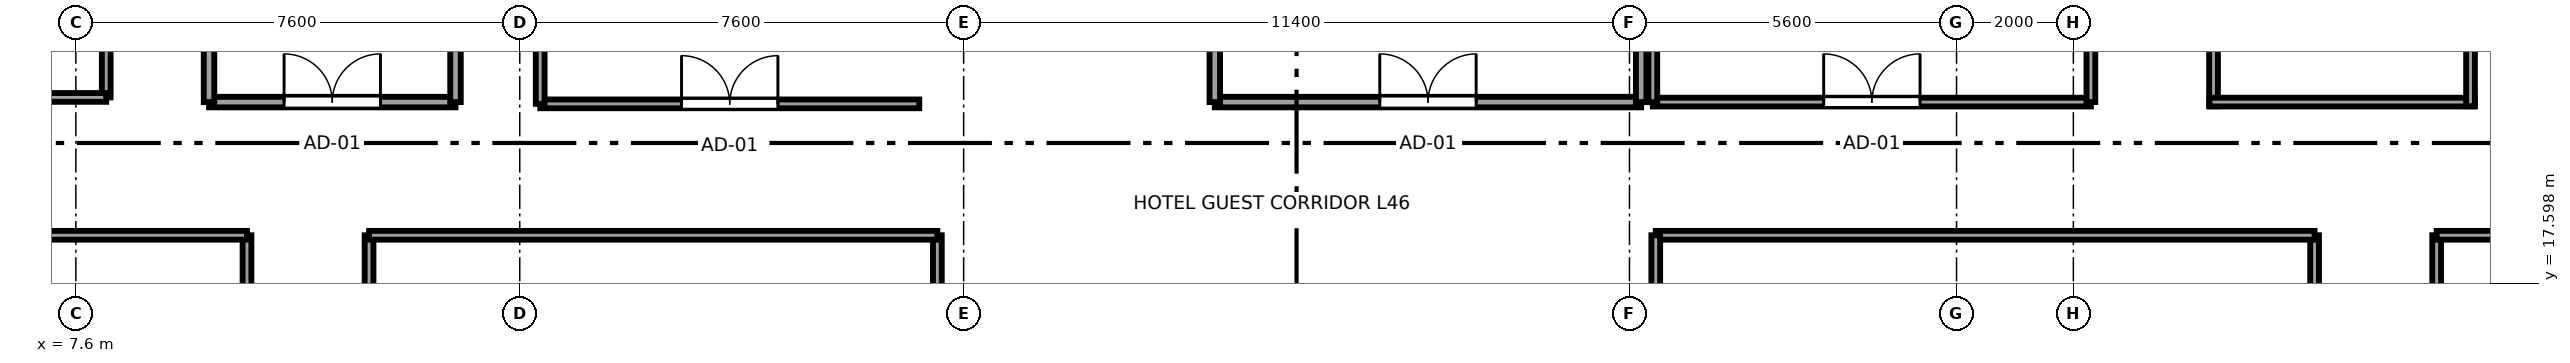
"""IFC4 building model, lengths in metres.
Left out: names, types, materials, properties, quantities, classifications, styles, units other than length and angle.
Written with IfcOpenShell. Run it as: python <this file> out.ifc"""

import sys

from ifc_helpers import new_model, si_unit, direction, frame, frame_2d, origin, place, context, subcontext, project, spatial, rectangle, extrude, source, transform, mapped, element, fill, save


model = new_model("IFC4")
c1 = context("Model", 3, precision=1e-05, world=origin(), true_north=direction((0.0, 1.0)))
c2 = subcontext(c1, "Body", "Model", "MODEL_VIEW")
j1 = project(units=[si_unit("LENGTHUNIT", "METRE"), si_unit("PLANEANGLEUNIT", "RADIAN")], contexts=[c1])
p1 = place(None, origin())
s1 = spatial("IfcSite", under=j1, at=p1, CompositionType="ELEMENT")
p2 = place(p1, origin())
s2 = spatial("IfcBuilding", under=s1, at=p2, CompositionType="ELEMENT")
p3 = place(p2, frame((0.0, 0.0, 175.45)))
s3 = spatial("IfcBuildingStorey", under=s2, at=p3, CompositionType="ELEMENT", Elevation=175.45)
p4 = place(p3, frame((10.53, 15.313, 0.0), z_axis=(0.0, 0.0, 1.0), x_axis=(0.0, 1.0, 0.0)))
e1 = element("IfcWall", 1, at=p4, inside=s3, PredefinedType="PARTITIONING", context=c2, shape_type="SweptSolid", body=[
    extrude(rectangle(XDim=3.107, YDim=0.15, at=frame_2d((1.553, 0.0))), origin(), (0.0, 0.0, 1.0), 3.37),
])
p5 = place(p4, frame((1.043, 0.0, 0.0)))
e2 = element("IfcOpeningElement", 2, at=p5, cuts=e1, PredefinedType="OPENING", context=c2, shape_type="SweptSolid", body=[
    extrude(rectangle(XDim=0.98, YDim=2.12, at=frame_2d((0.49, 1.06))), frame((0.0, 0.085, 0.0), z_axis=(0.0, -1.0, 0.0), x_axis=(1.0, 0.0, 0.0)), (0.0, 0.0, 1.0), 0.17),
])
p6 = place(p3, frame((3.005, 18.42, 0.0), z_axis=(0.0, 0.0, 1.0), x_axis=(1.0, 0.0, 0.0)))
e3 = element("IfcWall", 3, at=p6, inside=s3, PredefinedType="PARTITIONING", context=c2, shape_type="SweptSolid", body=[
    extrude(rectangle(XDim=7.525, YDim=0.15, at=frame_2d((3.763, 0.0))), origin(), (0.0, 0.0, 1.0), 3.37),
])
p7 = place(p3, frame((12.62, 13.21, 0.0), z_axis=(0.0, 0.0, 1.0), x_axis=(0.0, 1.0, 0.0)))
e4 = element("IfcWall", 4, at=p7, inside=s3, PredefinedType="PARTITIONING", context=c2, shape_type="SweptSolid", body=[
    extrude(rectangle(XDim=5.21, YDim=0.15, at=frame_2d((2.605, 0.0))), origin(), (0.0, 0.0, 1.0), 3.37),
])
p8 = place(p7, frame((2.095, 0.0, 0.0)))
e5 = element("IfcOpeningElement", 5, at=p8, cuts=e4, PredefinedType="OPENING", context=c2, shape_type="SweptSolid", body=[
    extrude(rectangle(XDim=0.98, YDim=2.12, at=frame_2d((0.49, 1.06))), frame((0.0, 0.085, 0.0), z_axis=(0.0, -1.0, 0.0), x_axis=(1.0, 0.0, 0.0)), (0.0, 0.0, 1.0), 0.17),
])
p9 = place(p3, frame((22.35, 10.88, 0.0), z_axis=(0.0, 0.0, 1.0), x_axis=(0.0, 1.0, 0.0)))
e6 = element("IfcWall", 6, at=p9, inside=s3, PredefinedType="PARTITIONING", context=c2, shape_type="SweptSolid", body=[
    extrude(rectangle(XDim=7.54, YDim=0.15, at=frame_2d((3.77, 0.0))), origin(), (0.0, 0.0, 1.0), 3.37),
])
p10 = place(p3, frame((12.62, 18.42, 0.0), z_axis=(0.0, 0.0, 1.0), x_axis=(1.0, 0.0, 0.0)))
e7 = element("IfcWall", 7, at=p10, inside=s3, PredefinedType="PARTITIONING", context=c2, shape_type="SweptSolid", body=[
    extrude(rectangle(XDim=9.73, YDim=0.15, at=frame_2d((4.865, 0.0))), origin(), (0.0, 0.0, 1.0), 3.37),
])
p11 = place(p3, frame((45.93, 15.437, 0.0), z_axis=(0.0, 0.0, 1.0), x_axis=(0.0, 1.0, 0.0)))
e8 = element("IfcWall", 8, at=p11, inside=s3, PredefinedType="PARTITIONING", context=c2, shape_type="SweptSolid", body=[
    extrude(rectangle(XDim=2.983, YDim=0.15, at=frame_2d((1.491, 0.0))), origin(), (0.0, 0.0, 1.0), 3.37),
])
p12 = place(p11, frame((0.981, 0.0, 0.0)))
e9 = element("IfcOpeningElement", 9, at=p12, cuts=e8, PredefinedType="OPENING", context=c2, shape_type="SweptSolid", body=[
    extrude(rectangle(XDim=0.98, YDim=2.12, at=frame_2d((0.49, 1.06))), frame((0.0, 0.085, 0.0), z_axis=(0.0, -1.0, 0.0), x_axis=(1.0, 0.0, 0.0)), (0.0, 0.0, 1.0), 0.17),
])
p13 = place(p3, frame((34.65, 18.42, 0.0), z_axis=(0.0, 0.0, 1.0), x_axis=(1.0, 0.0, 0.0)))
e10 = element("IfcWall", 10, at=p13, inside=s3, PredefinedType="PARTITIONING", context=c2, shape_type="SweptSolid", body=[
    extrude(rectangle(XDim=11.28, YDim=0.15, at=frame_2d((5.64, 0.0))), origin(), (0.0, 0.0, 1.0), 3.37),
])
p14 = place(p3, frame((34.65, 13.48, 0.0), z_axis=(0.0, 0.0, 1.0), x_axis=(0.0, 1.0, 0.0)))
e11 = element("IfcWall", 11, at=p14, inside=s3, PredefinedType="PARTITIONING", context=c2, shape_type="SweptSolid", body=[
    extrude(rectangle(XDim=4.94, YDim=0.15, at=frame_2d((2.47, 0.0))), origin(), (0.0, 0.0, 1.0), 3.37),
])
p15 = place(p3, frame((48.02, 15.313, 0.0), z_axis=(0.0, 0.0, 1.0), x_axis=(0.0, 1.0, 0.0)))
e12 = element("IfcWall", 12, at=p15, inside=s3, PredefinedType="PARTITIONING", context=c2, shape_type="SweptSolid", body=[
    extrude(rectangle(XDim=3.107, YDim=0.15, at=frame_2d((1.553, 0.0))), origin(), (0.0, 0.0, 1.0), 3.37),
])
p16 = place(p15, frame((1.043, 0.0, 0.0)))
e13 = element("IfcOpeningElement", 13, at=p16, cuts=e12, PredefinedType="OPENING", context=c2, shape_type="SweptSolid", body=[
    extrude(rectangle(XDim=0.98, YDim=2.12, at=frame_2d((0.49, 1.06))), frame((0.0, 0.085, 0.0), z_axis=(0.0, -1.0, 0.0), x_axis=(1.0, 0.0, 0.0)), (0.0, 0.0, 1.0), 0.17),
])
p17 = place(p3, frame((48.02, 18.42, 0.0), z_axis=(0.0, 0.0, 1.0), x_axis=(1.0, 0.0, 0.0)))
e14 = element("IfcWall", 14, at=p17, inside=s3, PredefinedType="PARTITIONING", context=c2, shape_type="SweptSolid", body=[
    extrude(rectangle(XDim=5.975, YDim=0.15, at=frame_2d((2.988, 0.0))), origin(), (0.0, 0.0, 1.0), 3.37),
])
p18 = place(p3, frame((8.12, 20.78, 0.0), z_axis=(0.0, 0.0, 1.0), x_axis=(0.0, 1.0, 0.0)))
e15 = element("IfcWall", 15, at=p18, inside=s3, PredefinedType="PARTITIONING", context=c2, shape_type="SweptSolid", body=[
    extrude(rectangle(XDim=13.54, YDim=0.15, at=frame_2d((6.77, 0.0))), origin(), (0.0, 0.0, 1.0), 3.37),
])
p19 = place(p18, frame((6.28, 0.0, 0.0)))
e16 = element("IfcOpeningElement", 16, at=p19, cuts=e15, PredefinedType="OPENING", context=c2, shape_type="SweptSolid", body=[
    extrude(rectangle(XDim=0.98, YDim=2.12, at=frame_2d((0.49, 1.06))), frame((0.0, 0.085, 0.0), z_axis=(0.0, -1.0, 0.0), x_axis=(1.0, 0.0, 0.0)), (0.0, 0.0, 1.0), 0.17),
])
p20 = place(p3, frame((5.07, 20.78, 0.0), z_axis=(0.0, 0.0, 1.0), x_axis=(1.0, 0.0, 0.0)))
e17 = element("IfcWall", 17, at=p20, inside=s3, PredefinedType="PARTITIONING", context=c2, shape_type="SweptSolid", body=[
    extrude(rectangle(XDim=3.05, YDim=0.15, at=frame_2d((1.525, 0.0))), origin(), (0.0, 0.0, 1.0), 3.37),
])
p21 = place(p3, frame((44.2, 20.63, 0.0), z_axis=(0.0, 0.0, 1.0), x_axis=(0.0, 1.0, 0.0)))
e18 = element("IfcWall", 18, at=p21, inside=s3, PredefinedType="PARTITIONING", context=c2, shape_type="SweptSolid", body=[
    extrude(rectangle(XDim=3.94, YDim=0.15, at=frame_2d((1.97, 0.0))), origin(), (0.0, 0.0, 1.0), 3.37),
])
p22 = place(p21, frame((1.34, 0.0, 0.0)))
e19 = element("IfcOpeningElement", 19, at=p22, cuts=e18, PredefinedType="OPENING", context=c2, shape_type="SweptSolid", body=[
    extrude(rectangle(XDim=0.92, YDim=2.01, at=frame_2d((0.46, 1.005))), frame((0.0, 0.085, 0.0), z_axis=(0.0, -1.0, 0.0), x_axis=(1.0, 0.0, 0.0)), (0.0, 0.0, 1.0), 0.17),
])
p23 = place(p3, frame((44.13, 20.7, 0.0), z_axis=(0.0, 0.0, 1.0), x_axis=(1.0, 0.0, 0.0)))
e20 = element("IfcWall", 20, at=p23, inside=s3, PredefinedType="PARTITIONING", context=c2, shape_type="SweptSolid", body=[
    extrude(rectangle(XDim=4.54, YDim=0.15, at=frame_2d((2.27, 0.0))), origin(), (0.0, 0.0, 1.0), 3.37),
])
p24 = place(p3, frame((48.6, 20.63, 0.0), z_axis=(0.0, 0.0, 1.0), x_axis=(0.0, 1.0, 0.0)))
e21 = element("IfcWall", 21, at=p24, inside=s3, PredefinedType="PARTITIONING", context=c2, shape_type="SweptSolid", body=[
    extrude(rectangle(XDim=3.94, YDim=0.15, at=frame_2d((1.97, 0.0))), origin(), (0.0, 0.0, 1.0), 3.37),
])
p25 = place(p3, frame((9.88, 20.7, 0.0), z_axis=(0.0, 0.0, 1.0), x_axis=(1.0, 0.0, 0.0)))
e22 = element("IfcWall", 22, at=p25, inside=s3, PredefinedType="PARTITIONING", context=c2, shape_type="SweptSolid", body=[
    extrude(rectangle(XDim=4.22, YDim=0.18, at=frame_2d((2.11, 0.0))), origin(), (0.0, 0.0, 1.0), 3.37),
])
p26 = place(p25, frame((1.285, 0.0, 0.0)))
e23 = element("IfcOpeningElement", 23, at=p26, cuts=e22, PredefinedType="OPENING", context=c2, shape_type="SweptSolid", body=[
    extrude(rectangle(XDim=1.65, YDim=2.15, at=frame_2d((0.825, 1.075))), frame((0.0, 0.1, 0.0), z_axis=(0.0, -1.0, 0.0), x_axis=(1.0, 0.0, 0.0)), (0.0, 0.0, 1.0), 0.2),
])
for number, where, z_axis, x_axis in (
    (24, (9.88, 20.7, 0.0), (0.0, 0.0, 1.0), (0.0, 1.0, 0.0)),
    (25, (14.1, 20.7, 0.0), (0.0, 0.0, 1.0), (0.0, 1.0, 0.0)),
):
    element("IfcWall", number, at=place(p3, frame(where, z_axis=z_axis, x_axis=x_axis)), inside=s3, PredefinedType="PARTITIONING", context=c2, shape_type="SweptSolid", body=[
        extrude(rectangle(XDim=9.05, YDim=0.18, at=frame_2d((4.525, 0.0))), origin(), (0.0, 0.0, 1.0), 3.37),
    ])
p27 = place(p3, frame((27.1, 20.7, 0.0), z_axis=(0.0, 0.0, 1.0), x_axis=(1.0, 0.0, 0.0)))
e26 = element("IfcWall", 26, at=p27, inside=s3, PredefinedType="PARTITIONING", context=c2, shape_type="SweptSolid", body=[
    extrude(rectangle(XDim=7.3, YDim=0.18, at=frame_2d((3.65, 0.0))), origin(), (0.0, 0.0, 1.0), 3.37),
])
p28 = place(p27, frame((2.825, 0.0, 0.0)))
e27 = element("IfcOpeningElement", 27, at=p28, cuts=e26, PredefinedType="OPENING", context=c2, shape_type="SweptSolid", body=[
    extrude(rectangle(XDim=1.65, YDim=2.15, at=frame_2d((0.825, 1.075))), frame((0.0, 0.1, 0.0), z_axis=(0.0, -1.0, 0.0), x_axis=(1.0, 0.0, 0.0)), (0.0, 0.0, 1.0), 0.2),
])
for number, where, z_axis, x_axis in (
    (28, (27.1, 20.7, 0.0), (0.0, 0.0, 1.0), (0.0, 1.0, 0.0)),
    (29, (34.4, 20.7, 0.0), (0.0, 0.0, 1.0), (0.0, 1.0, 0.0)),
):
    element("IfcWall", number, at=place(p3, frame(where, z_axis=z_axis, x_axis=x_axis)), inside=s3, PredefinedType="PARTITIONING", context=c2, shape_type="SweptSolid", body=[
        extrude(rectangle(XDim=9.1, YDim=0.18, at=frame_2d((4.55, 0.0))), origin(), (0.0, 0.0, 1.0), 3.37),
    ])
p29 = place(p3, frame((15.55, 20.67, 0.0), z_axis=(0.0, 0.0, 1.0), x_axis=(1.0, 0.0, 0.0)))
e30 = element("IfcWall", 30, at=p29, inside=s3, PredefinedType="PARTITIONING", context=c2, shape_type="SweptSolid", body=[
    extrude(rectangle(XDim=6.49, YDim=0.15, at=frame_2d((3.245, 0.0))), origin(), (0.0, 0.0, 1.0), 3.37),
])
p30 = place(p29, frame((2.42, 0.0, 0.0)))
e31 = element("IfcOpeningElement", 31, at=p30, cuts=e30, PredefinedType="OPENING", context=c2, shape_type="SweptSolid", body=[
    extrude(rectangle(XDim=1.65, YDim=2.15, at=frame_2d((0.825, 1.075))), frame((0.0, 0.085, 0.0), z_axis=(0.0, -1.0, 0.0), x_axis=(1.0, 0.0, 0.0)), (0.0, 0.0, 1.0), 0.17),
])
p31 = place(p3, frame((15.55, 20.67, 0.0), z_axis=(0.0, 0.0, 1.0), x_axis=(0.0, 1.0, 0.0)))
e32 = element("IfcWall", 32, at=p31, inside=s3, PredefinedType="PARTITIONING", context=c2, shape_type="SweptSolid", body=[
    extrude(rectangle(XDim=4.08, YDim=0.15, at=frame_2d((2.04, 0.0))), origin(), (0.0, 0.0, 1.0), 3.37),
])
p32 = place(p3, frame((34.6, 20.7, 0.0), z_axis=(0.0, 0.0, 1.0), x_axis=(1.0, 0.0, 0.0)))
e33 = element("IfcWall", 33, at=p32, inside=s3, PredefinedType="PARTITIONING", context=c2, shape_type="SweptSolid", body=[
    extrude(rectangle(XDim=7.5, YDim=0.15, at=frame_2d((3.75, 0.0))), origin(), (0.0, 0.0, 1.0), 3.37),
])
p33 = place(p32, frame((2.925, 0.0, 0.0)))
e34 = element("IfcOpeningElement", 34, at=p33, cuts=e33, PredefinedType="OPENING", context=c2, shape_type="SweptSolid", body=[
    extrude(rectangle(XDim=1.65, YDim=2.15, at=frame_2d((0.825, 1.075))), frame((0.0, 0.085, 0.0), z_axis=(0.0, -1.0, 0.0), x_axis=(1.0, 0.0, 0.0)), (0.0, 0.0, 1.0), 0.17),
])
p34 = place(p3, frame((34.6, 20.7, 0.0), z_axis=(0.0, 0.0, 1.0), x_axis=(0.0, 1.0, 0.0)))
e35 = element("IfcWall", 35, at=p34, inside=s3, PredefinedType="PARTITIONING", context=c2, shape_type="SweptSolid", body=[
    extrude(rectangle(XDim=8.7, YDim=0.15, at=frame_2d((4.35, 0.0))), origin(), (0.0, 0.0, 1.0), 3.37),
])
p35 = place(p3, frame((42.1, 20.7, 0.0), z_axis=(0.0, 0.0, 1.0), x_axis=(0.0, 1.0, 0.0)))
e36 = element("IfcWall", 36, at=p35, inside=s3, PredefinedType="PARTITIONING", context=c2, shape_type="SweptSolid", body=[
    extrude(rectangle(XDim=8.7, YDim=0.15, at=frame_2d((4.35, 0.0))), origin(), (0.0, 0.0, 1.0), 2.16),
])
m1 = source(origin(), c2, "Body", "SweptSolid", [
    extrude(rectangle(XDim=1.65, YDim=2.15, at=frame_2d((0.825, 1.075))), frame((0.0, 0.025, 0.0), z_axis=(0.0, -1.0, 0.0), x_axis=(1.0, 0.0, 0.0)), (0.0, 0.0, 1.0), 0.05),
])
p36 = place(p26, origin())
e37 = element("IfcDoor", 37, at=p36, inside=s3, OperationType="DOUBLE_DOOR_SINGLE_SWING", PredefinedType="DOOR", context=c2, shape_type="MappedRepresentation", body=[
    mapped(m1, transform((0.0, 0.0, 0.0), x_axis=(1.0, 0.0, 0.0), y_axis=(0.0, 1.0, 0.0), z_axis=(0.0, 0.0, 1.0), scale=1.0)),
])
fill(e23, e37)
p37 = place(p28, origin())
e38 = element("IfcDoor", 38, at=p37, inside=s3, OperationType="DOUBLE_DOOR_SINGLE_SWING", PredefinedType="DOOR", context=c2, shape_type="MappedRepresentation", body=[
    mapped(m1, transform((0.0, 0.0, 0.0), x_axis=(1.0, 0.0, 0.0), y_axis=(0.0, 1.0, 0.0), z_axis=(0.0, 0.0, 1.0), scale=1.0)),
])
fill(e27, e38)
p38 = place(p30, origin())
e39 = element("IfcDoor", 39, at=p38, inside=s3, OperationType="DOUBLE_DOOR_SINGLE_SWING", PredefinedType="DOOR", context=c2, shape_type="MappedRepresentation", body=[
    mapped(m1, transform((0.0, 0.0, 0.0), x_axis=(1.0, 0.0, 0.0), y_axis=(0.0, 1.0, 0.0), z_axis=(0.0, 0.0, 1.0), scale=1.0)),
])
fill(e31, e39)
p39 = place(p33, origin())
e40 = element("IfcDoor", 40, at=p39, inside=s3, OperationType="DOUBLE_DOOR_SINGLE_SWING", PredefinedType="DOOR", context=c2, shape_type="MappedRepresentation", body=[
    mapped(m1, transform((0.0, 0.0, 0.0), x_axis=(1.0, 0.0, 0.0), y_axis=(0.0, 1.0, 0.0), z_axis=(0.0, 0.0, 1.0), scale=1.0)),
])
fill(e34, e40)
save(model, sys.argv[1])
